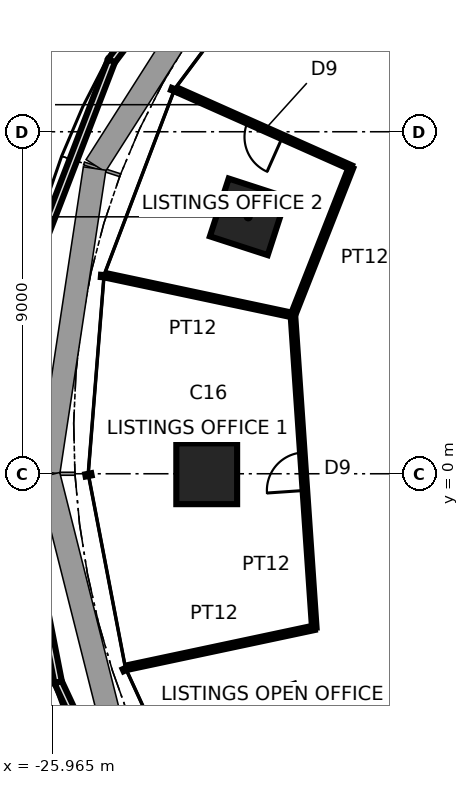
"""IFC4 building model, lengths in metres.
Left out: names, types, materials, properties, quantities, classifications, styles, units other than length and angle.
Written with IfcOpenShell. Run it as: python <this file> out.ifc"""

import sys

from ifc_helpers import new_model, si_unit, direction, frame, frame_2d, origin, origin_2d, place, context, subcontext, project, spatial, rectangle, extrude, element, fill, save


model = new_model("IFC4")
c1 = context("Model", 3, precision=1e-05, world=origin(), true_north=direction((0.0, 1.0)))
c2 = subcontext(c1, "Body", "Model", "MODEL_VIEW")
j1 = project(units=[si_unit("LENGTHUNIT", "METRE"), si_unit("PLANEANGLEUNIT", "RADIAN")], contexts=[c1])
p1 = place(None, origin())
s1 = spatial("IfcSite", under=j1, at=p1, CompositionType="ELEMENT")
p2 = place(p1, origin())
s2 = spatial("IfcBuilding", under=s1, at=p2, CompositionType="ELEMENT")
p3 = place(p2, frame((0.0, 0.0, 92.4)))
s3 = spatial("IfcBuildingStorey", under=s2, at=p3, CompositionType="ELEMENT", Elevation=92.4)
for number, where, z_axis, x_axis in (
    (1, (-20.808, 6.761, 0.0), (0.0, 0.0, 1.0), (-0.951, 0.309, 0.0)),
    (2, (-21.9, 0.0, 0.0), (0.0, 0.0, 1.0), (-1.0, 0.0, 0.0)),
    (3, (-20.109, -6.534, 0.0), (0.0, 0.0, 1.0), (-0.951, -0.309, 0.0)),
):
    element("IfcColumn", number, at=place(p3, frame(where, z_axis=z_axis, x_axis=x_axis)), inside=s3, PredefinedType="COLUMN", context=c2, shape_type="SweptSolid", body=[
        extrude(rectangle(XDim=1.6, YDim=1.6, at=origin_2d()), origin(), (0.0, 0.0, 1.0), 3.9),
    ])
p4 = place(p3, frame((-21.062, 15.302, 0.0), z_axis=(0.0, 0.0, 1.0), x_axis=(-0.602135346541, -0.798394028313, 0.0)))
e4 = element("IfcWall", 4, at=p4, inside=s3, PredefinedType="PARAPET", context=c2, shape_type="SweptSolid", body=[
    extrude(rectangle(XDim=5.556, YDim=0.2, at=frame_2d((2.778, 0.0))), origin(), (0.0, 0.0, 1.0), 1.1),
])
p5 = place(p3, frame((-24.407, 10.866, 0.0), z_axis=(0.0, 0.0, 1.0), x_axis=(-0.359107059798, -0.933296372865, 0.0)))
e5 = element("IfcWall", 5, at=p5, inside=s3, PredefinedType="PARAPET", context=c2, shape_type="SweptSolid", body=[
    extrude(rectangle(XDim=5.625, YDim=0.2, at=frame_2d((2.812, 0.0))), origin(), (0.0, 0.0, 1.0), 1.1),
])
p6 = place(p3, frame((-26.88, 0.0, 0.0), z_axis=(0.0, 0.0, 1.0), x_axis=(0.191485729296, -0.981495397583, 0.0)))
e6 = element("IfcWall", 6, at=p6, inside=s3, PredefinedType="PARAPET", context=c2, shape_type="SweptSolid", body=[
    extrude(rectangle(XDim=5.59, YDim=0.2, at=frame_2d((2.795, 0.0))), origin(), (0.0, 0.0, 1.0), 1.1),
])
p7 = place(p3, frame((-25.81, -5.486, 0.0), z_axis=(0.0, 0.0, 1.0), x_axis=(0.422500542985, -0.906362670887, 0.0)))
e7 = element("IfcWall", 7, at=p7, inside=s3, PredefinedType="PARAPET", context=c2, shape_type="SweptSolid", body=[
    extrude(rectangle(XDim=5.487, YDim=0.2, at=frame_2d((2.743, 0.0))), origin(), (0.0, 0.0, 1.0), 1.1),
])
p8 = place(p3, frame((-23.96, -5.093, 0.0), z_axis=(0.0, 0.0, 1.0), x_axis=(0.978149046495, 0.207904888932, 0.0)))
e8 = element("IfcWall", 8, at=p8, inside=s3, PredefinedType="PARTITIONING", context=c2, shape_type="SweptSolid", body=[
    extrude(rectangle(XDim=5.0, YDim=0.12, at=frame_2d((2.5, 0.0))), origin(), (0.0, 0.0, 1.0), 3.74),
])
p9 = place(p3, frame((-18.102, 8.06, 0.0), z_axis=(0.0, 0.0, 1.0), x_axis=(-0.913549606868, 0.406727323635, 0.0)))
e9 = element("IfcWall", 9, at=p9, inside=s3, PredefinedType="PARTITIONING", context=c2, shape_type="SweptSolid", body=[
    extrude(rectangle(XDim=5.0, YDim=0.12, at=frame_2d((2.5, 0.0))), origin(), (0.0, 0.0, 1.0), 3.74),
])
p10 = place(p9, frame((1.975, 0.0, 0.0)))
e10 = element("IfcOpeningElement", 10, at=p10, cuts=e9, PredefinedType="OPENING", context=c2, shape_type="SweptSolid", body=[
    extrude(rectangle(XDim=1.0, YDim=2.4, at=frame_2d((0.5, 1.2))), frame((0.0, 0.07, 0.0), z_axis=(0.0, -1.0, 0.0), x_axis=(1.0, 0.0, 0.0)), (0.0, 0.0, 1.0), 0.14),
])
p11 = place(p3, frame((-19.632, 4.173, 0.0), z_axis=(0.0, 0.0, 1.0), x_axis=(0.366366585736, 0.930470593225, 0.0)))
e11 = element("IfcWall", 11, at=p11, inside=s3, PredefinedType="PARTITIONING", context=c2, shape_type="SweptSolid", body=[
    extrude(rectangle(XDim=4.177, YDim=0.12, at=frame_2d((2.088, 0.0))), origin(), (0.0, 0.0, 1.0), 3.74),
])
p12 = place(p3, frame((-24.523, 5.212, 0.0), z_axis=(0.0, 0.0, 1.0), x_axis=(0.978158975012, -0.207858171848, 0.0)))
e12 = element("IfcWall", 12, at=p12, inside=s3, PredefinedType="PARTITIONING", context=c2, shape_type="SweptSolid", body=[
    extrude(rectangle(XDim=5.0, YDim=0.12, at=frame_2d((2.5, 0.0))), origin(), (0.0, 0.0, 1.0), 3.74),
])
p13 = place(p3, frame((-19.07, -4.053, 0.0), z_axis=(0.0, 0.0, 1.0), x_axis=(-0.068216787808, 0.997670521696, 0.0)))
e13 = element("IfcWall", 13, at=p13, inside=s3, PredefinedType="PARTITIONING", context=c2, shape_type="SweptSolid", body=[
    extrude(rectangle(XDim=8.246, YDim=0.12, at=frame_2d((4.123, 0.0))), origin(), (0.0, 0.0, 1.0), 3.286),
])
p14 = place(p13, frame((3.623, 0.0, 0.0)))
e14 = element("IfcOpeningElement", 14, at=p14, cuts=e13, PredefinedType="OPENING", context=c2, shape_type="SweptSolid", body=[
    extrude(rectangle(XDim=1.0, YDim=2.4, at=frame_2d((0.5, 1.2))), frame((0.0, 0.07, 0.0), z_axis=(0.0, -1.0, 0.0), x_axis=(1.0, 0.0, 0.0)), (0.0, 0.0, 1.0), 0.14),
])
p15 = place(p14, origin())
e15 = element("IfcDoor", 15, at=p15, inside=s3, OperationType="SINGLE_SWING_LEFT", PredefinedType="DOOR", context=c2, shape_type="SweptSolid", body=[
    extrude(rectangle(XDim=1.0, YDim=2.4, at=frame_2d((0.5, 1.2))), frame((0.0, 0.025, 0.0), z_axis=(0.0, -1.0, 0.0), x_axis=(1.0, 0.0, 0.0)), (0.0, 0.0, 1.0), 0.05),
])
fill(e14, e15)
p16 = place(p10, origin())
e16 = element("IfcDoor", 16, at=p16, inside=s3, OperationType="SINGLE_SWING_LEFT", PredefinedType="DOOR", context=c2, shape_type="SweptSolid", body=[
    extrude(rectangle(XDim=1.0, YDim=2.4, at=frame_2d((0.5, 1.2))), frame((0.0, 0.025, 0.0), z_axis=(0.0, -1.0, 0.0), x_axis=(1.0, 0.0, 0.0)), (0.0, 0.0, 1.0), 0.05),
])
fill(e10, e16)
save(model, sys.argv[1])
